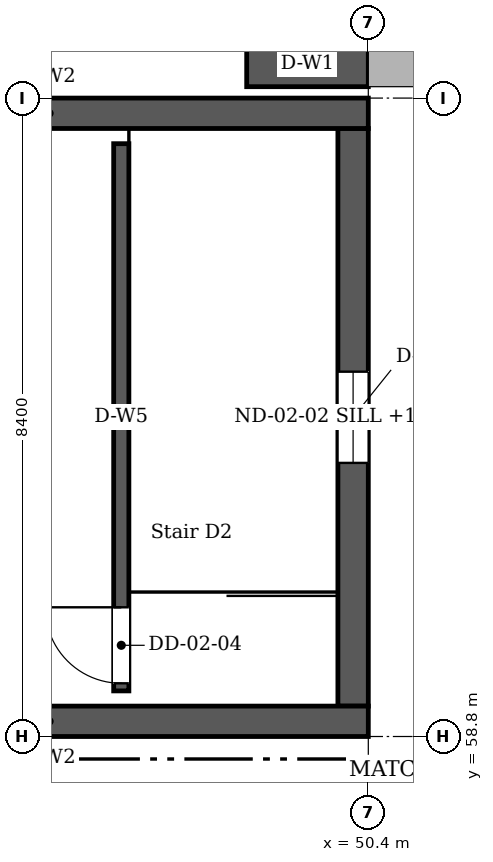
"""IFC4 building model, lengths in metres.
Left out: names, types, materials, properties, quantities, classifications, styles, units other than length and angle.
Written with IfcOpenShell. Run it as: python <this file> out.ifc"""

import sys

from ifc_helpers import new_model, si_unit, direction, frame, frame_2d, origin, place, context, subcontext, project, spatial, rectangle, extrude, element, fill, save


model = new_model("IFC4")
c1 = context("Model", 3, precision=1e-05, world=origin(), true_north=direction((0.0, 1.0)))
c2 = subcontext(c1, "Body", "Model", "MODEL_VIEW")
j1 = project(units=[si_unit("LENGTHUNIT", "METRE"), si_unit("PLANEANGLEUNIT", "RADIAN")], contexts=[c1])
p1 = place(None, origin())
s1 = spatial("IfcSite", under=j1, at=p1, CompositionType="ELEMENT")
p2 = place(p1, origin())
s2 = spatial("IfcBuilding", under=s1, at=p2, CompositionType="ELEMENT")
p3 = place(p2, origin())
s3 = spatial("IfcBuildingStorey", under=s2, at=p3, CompositionType="ELEMENT", Elevation=0.0)
p4 = place(p3, frame((50.4, 67.65, 0.0), z_axis=(0.0, 0.0, 1.0), x_axis=(-1.0, 0.0, 0.0)))
e1 = element("IfcWall", 1, at=p4, inside=s3, PredefinedType="SOLIDWALL", context=c2, shape_type="SweptSolid", body=[
    extrude(rectangle(XDim=1.6, YDim=0.6, at=frame_2d((0.8, 0.0))), origin(), (0.0, 0.0, 1.0), 14.467),
])
p5 = place(p2, frame((0.0, 0.0, 10.2)))
s4 = spatial("IfcBuildingStorey", under=s2, at=p5, CompositionType="ELEMENT", Elevation=10.2)
for number, where, z_axis, x_axis in (
    (2, (42.0, 59.0, 0.0), (0.0, 0.0, 1.0), (1.0, 0.0, 0.0)),
    (3, (42.0, 67.0, 0.0), (0.0, 0.0, 1.0), (1.0, 0.0, 0.0)),
):
    element("IfcWall", number, at=place(p5, frame(where, z_axis=z_axis, x_axis=x_axis)), inside=s4, PredefinedType="SOLIDWALL", context=c2, shape_type="SweptSolid", body=[
        extrude(rectangle(XDim=8.4, YDim=0.4, at=frame_2d((4.2, 0.0))), origin(), (0.0, 0.0, 1.0), 3.92),
    ])
p6 = place(p5, frame((50.2, 59.2, 0.0), z_axis=(0.0, 0.0, 1.0), x_axis=(0.0, 1.0, 0.0)))
e4 = element("IfcWall", 4, at=p6, inside=s4, PredefinedType="SOLIDWALL", context=c2, shape_type="SweptSolid", body=[
    extrude(rectangle(XDim=7.6, YDim=0.4, at=frame_2d((3.8, 0.0))), origin(), (0.0, 0.0, 1.0), 3.92),
])
p7 = place(p6, frame((3.2, 0.0, 0.9)))
e5 = element("IfcOpeningElement", 5, at=p7, cuts=e4, PredefinedType="OPENING", context=c2, shape_type="SweptSolid", body=[
    extrude(rectangle(XDim=1.2, YDim=1.5, at=frame_2d((0.6, 0.75))), frame((0.0, 0.21, 0.0), z_axis=(0.0, -1.0, 0.0), x_axis=(1.0, 0.0, 0.0)), (0.0, 0.0, 1.0), 0.42),
])
p8 = place(p5, frame((47.15, 59.4, 0.0), z_axis=(0.0, 0.0, 1.0), x_axis=(0.0, 1.0, 0.0)))
e6 = element("IfcWall", 6, at=p8, inside=s4, PredefinedType="SOLIDWALL", context=c2, shape_type="SweptSolid", body=[
    extrude(rectangle(XDim=7.2, YDim=0.2, at=frame_2d((3.6, 0.0))), origin(), (0.0, 0.0, 1.0), 3.92),
])
p9 = place(p8, frame((0.1, 0.0, 0.0)))
e7 = element("IfcOpeningElement", 7, at=p9, cuts=e6, PredefinedType="OPENING", context=c2, shape_type="SweptSolid", body=[
    extrude(rectangle(XDim=1.0, YDim=2.1, at=frame_2d((0.5, 1.05))), frame((0.0, 0.11, 0.0), z_axis=(0.0, -1.0, 0.0), x_axis=(1.0, 0.0, 0.0)), (0.0, 0.0, 1.0), 0.22),
])
p10 = place(p7, origin())
e8 = element("IfcWindow", 8, at=p10, inside=s4, PartitioningType="SINGLE_PANEL", PredefinedType="WINDOW", context=c2, shape_type="SweptSolid", body=[
    extrude(rectangle(XDim=1.2, YDim=1.5, at=frame_2d((0.6, 0.75))), frame((0.0, 0.03, 0.0), z_axis=(0.0, -1.0, 0.0), x_axis=(1.0, 0.0, 0.0)), (0.0, 0.0, 1.0), 0.06),
])
fill(e5, e8)
p11 = place(p9, origin())
e9 = element("IfcDoor", 9, at=p11, inside=s4, OperationType="SINGLE_SWING_LEFT", PredefinedType="DOOR", context=c2, shape_type="SweptSolid", body=[
    extrude(rectangle(XDim=1.0, YDim=2.1, at=frame_2d((0.5, 1.05))), frame((0.0, 0.025, 0.0), z_axis=(0.0, -1.0, 0.0), x_axis=(1.0, 0.0, 0.0)), (0.0, 0.0, 1.0), 0.05),
])
fill(e7, e9)
save(model, sys.argv[1])
